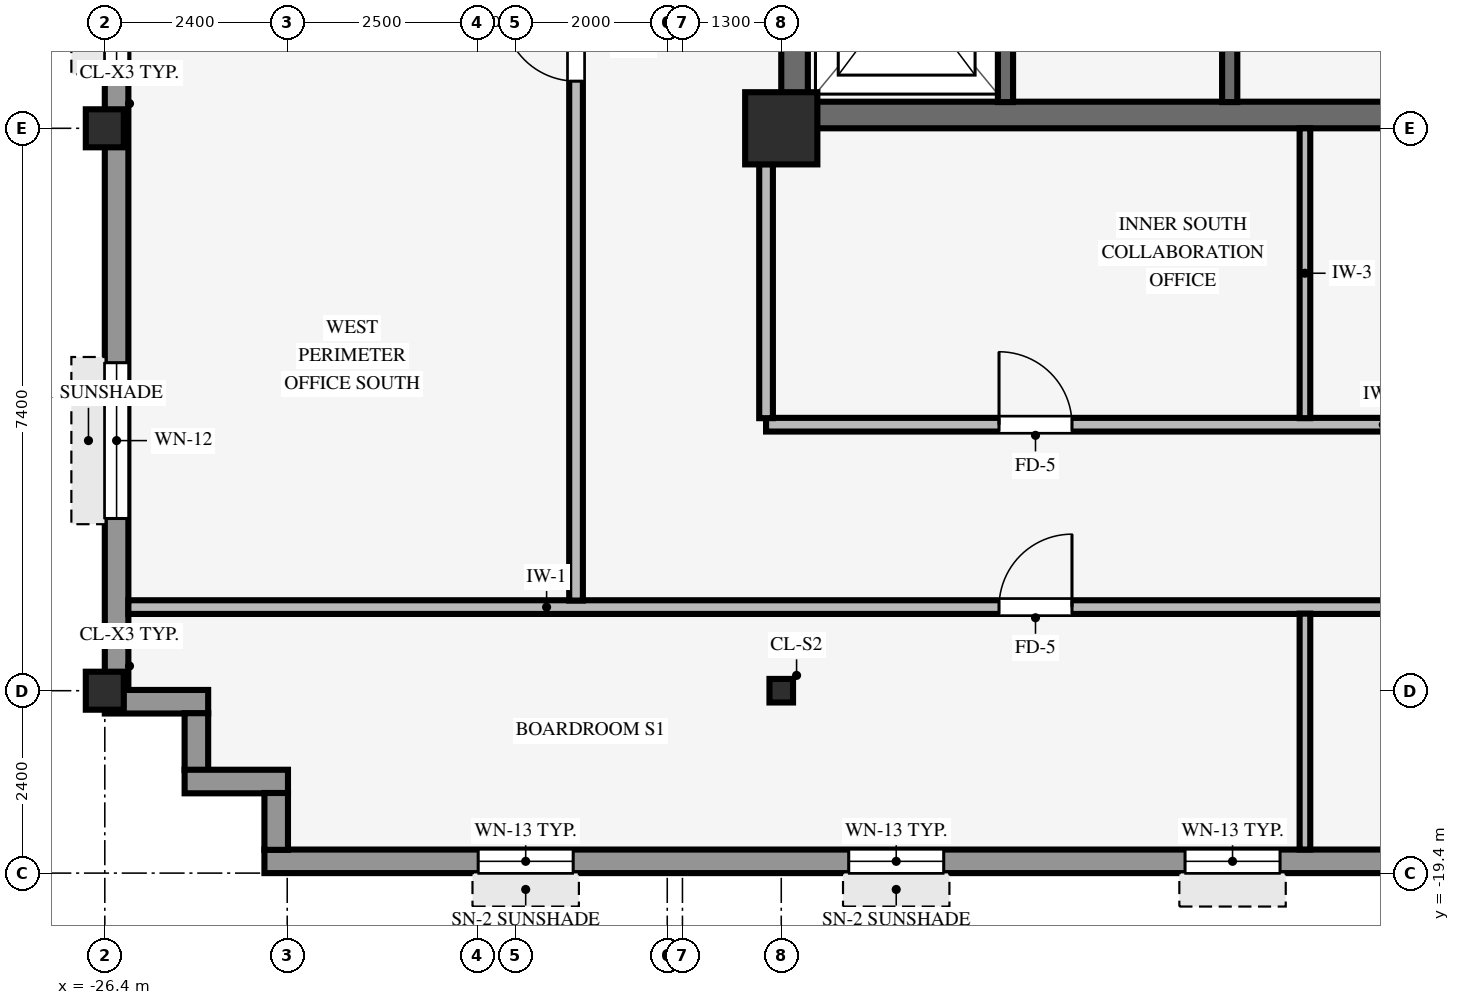
"""IFC4 building model, lengths in metres.
Left out: names, types, materials, properties, quantities, classifications, styles, units other than length and angle.
Written with IfcOpenShell. Run it as: python <this file> out.ifc"""

import sys

from ifc_helpers import new_model, si_unit, direction, frame, frame_2d, origin, origin_2d, place, context, subcontext, project, spatial, rectangle, hollow_rectangle, i_section, extrude, source, transform, mapped, element, fill, save


model = new_model("IFC4")
c1 = context("Model", 3, precision=1e-05, world=origin(), true_north=direction((0.0, 1.0)))
c2 = subcontext(c1, "Body", "Model", "MODEL_VIEW")
j1 = project(units=[si_unit("LENGTHUNIT", "METRE"), si_unit("PLANEANGLEUNIT", "RADIAN")], contexts=[c1])
p1 = place(None, origin())
s1 = spatial("IfcSite", under=j1, at=p1, CompositionType="ELEMENT")
p2 = place(p1, origin())
s2 = spatial("IfcBuilding", under=s1, at=p2, CompositionType="ELEMENT")
p3 = place(p2, frame((0.0, 0.0, 212.8)))
s3 = spatial("IfcBuildingStorey", under=s2, at=p3, CompositionType="ELEMENT", Elevation=212.8)
p4 = place(p3, frame((-17.5, -9.425, 0.0), z_axis=(0.0, 0.0, 1.0), x_axis=(1.0, 0.0, 0.0)))
e1 = element("IfcWall", 1, at=p4, inside=s3, PredefinedType="SHEAR", context=c2, shape_type="SweptSolid", body=[
    extrude(rectangle(XDim=8.5, YDim=0.35, at=frame_2d((4.25, 0.0))), origin(), (0.0, 0.0, 1.0), 3.37),
])
p5 = place(p3, frame((-17.325, -9.255, 0.0), z_axis=(0.0, 0.0, 1.0), x_axis=(0.0, 1.0, 0.0)))
e2 = element("IfcWall", 2, at=p5, inside=s3, PredefinedType="SHEAR", context=c2, shape_type="SweptSolid", body=[
    extrude(rectangle(XDim=18.51, YDim=0.35, at=frame_2d((9.255, 0.0))), origin(), (0.0, 0.0, 1.0), 3.37),
])
p6 = place(p3, frame((-17.5, -9.6, 0.0), z_axis=(0.0, 0.0, 1.0), x_axis=(1.0, 0.0, 0.0)))
e3 = element("IfcColumn", 3, at=p6, inside=s3, PredefinedType="COLUMN", context=c2, shape_type="SweptSolid", body=[
    extrude(rectangle(XDim=0.95, YDim=0.95, at=origin_2d()), origin(), (0.0, 0.0, 1.0), 3.37),
])
for number, where, z_axis, x_axis in (
    (4, (-26.4, -17.0, 0.0), (0.0, 0.0, 1.0), (1.0, 0.0, 0.0)),
    (5, (-26.4, -9.6, 0.0), (0.0, 0.0, 1.0), (1.0, 0.0, 0.0)),
):
    element("IfcColumn", number, at=place(p3, frame(where, z_axis=z_axis, x_axis=x_axis)), inside=s3, PredefinedType="COLUMN", context=c2, shape_type="SweptSolid", body=[
        extrude(hollow_rectangle(XDim=0.5, YDim=0.5, WallThickness=0.032, InnerFilletRadius=0.032, OuterFilletRadius=0.064, at=origin_2d()), origin(), (0.0, 0.0, 1.0), 3.37),
    ])
p7 = place(p3, frame((-17.5, -17.0, 0.0), z_axis=(0.0, 0.0, 1.0), x_axis=(1.0, 0.0, 0.0)))
e6 = element("IfcColumn", 6, at=p7, inside=s3, PredefinedType="COLUMN", context=c2, shape_type="SweptSolid", body=[
    extrude(i_section(OverallWidth=0.31, OverallDepth=0.31, WebThickness=0.015, FlangeThickness=0.015, FilletRadius=0.015, at=origin_2d()), origin(), (0.0, 0.0, 1.0), 3.37),
])
p8 = place(p3, frame((-24.3, -19.245, 0.0), z_axis=(0.0, 0.0, 1.0), x_axis=(1.0, 0.0, 0.0)))
e7 = element("IfcWall", 7, at=p8, inside=s3, PredefinedType="STANDARD", context=c2, shape_type="SweptSolid", body=[
    extrude(rectangle(XDim=41.0, YDim=0.31, at=frame_2d((20.5, 0.0))), origin(), (0.0, 0.0, 1.0), 2.705),
])
p9 = place(p8, frame((2.812, 0.0, 0.8)))
e8 = element("IfcOpeningElement", 8, at=p9, cuts=e7, PredefinedType="OPENING", context=c2, shape_type="SweptSolid", body=[
    extrude(rectangle(XDim=1.25, YDim=1.52, at=frame_2d((0.625, 0.76))), frame((0.0, 0.165, 0.0), z_axis=(0.0, -1.0, 0.0), x_axis=(1.0, 0.0, 0.0)), (0.0, 0.0, 1.0), 0.33),
])
p10 = place(p8, frame((7.688, 0.0, 0.8)))
e9 = element("IfcOpeningElement", 9, at=p10, cuts=e7, PredefinedType="OPENING", context=c2, shape_type="SweptSolid", body=[
    extrude(rectangle(XDim=1.25, YDim=1.52, at=frame_2d((0.625, 0.76))), frame((0.0, 0.165, 0.0), z_axis=(0.0, -1.0, 0.0), x_axis=(1.0, 0.0, 0.0)), (0.0, 0.0, 1.0), 0.33),
])
p11 = place(p8, frame((12.113, 0.0, 0.8)))
e10 = element("IfcOpeningElement", 10, at=p11, cuts=e7, PredefinedType="OPENING", context=c2, shape_type="SweptSolid", body=[
    extrude(rectangle(XDim=1.25, YDim=1.52, at=frame_2d((0.625, 0.76))), frame((0.0, 0.165, 0.0), z_axis=(0.0, -1.0, 0.0), x_axis=(1.0, 0.0, 0.0)), (0.0, 0.0, 1.0), 0.33),
])
p12 = place(p8, frame((17.438, 0.0, 0.8)))
e11 = element("IfcOpeningElement", 11, at=p12, cuts=e7, PredefinedType="OPENING", context=c2, shape_type="SweptSolid", body=[
    extrude(rectangle(XDim=1.25, YDim=1.52, at=frame_2d((0.625, 0.76))), frame((0.0, 0.165, 0.0), z_axis=(0.0, -1.0, 0.0), x_axis=(1.0, 0.0, 0.0)), (0.0, 0.0, 1.0), 0.33),
])
p13 = place(p8, frame((22.312, 0.0, 0.8)))
e12 = element("IfcOpeningElement", 12, at=p13, cuts=e7, PredefinedType="OPENING", context=c2, shape_type="SweptSolid", body=[
    extrude(rectangle(XDim=1.25, YDim=1.52, at=frame_2d((0.625, 0.76))), frame((0.0, 0.165, 0.0), z_axis=(0.0, -1.0, 0.0), x_axis=(1.0, 0.0, 0.0)), (0.0, 0.0, 1.0), 0.33),
])
p14 = place(p8, frame((27.188, 0.0, 0.8)))
e13 = element("IfcOpeningElement", 13, at=p14, cuts=e7, PredefinedType="OPENING", context=c2, shape_type="SweptSolid", body=[
    extrude(rectangle(XDim=1.25, YDim=1.52, at=frame_2d((0.625, 0.76))), frame((0.0, 0.165, 0.0), z_axis=(0.0, -1.0, 0.0), x_axis=(1.0, 0.0, 0.0)), (0.0, 0.0, 1.0), 0.33),
])
p15 = place(p8, frame((31.163, 0.0, 0.8)))
e14 = element("IfcOpeningElement", 14, at=p15, cuts=e7, PredefinedType="OPENING", context=c2, shape_type="SweptSolid", body=[
    extrude(rectangle(XDim=1.25, YDim=1.52, at=frame_2d((0.625, 0.76))), frame((0.0, 0.165, 0.0), z_axis=(0.0, -1.0, 0.0), x_axis=(1.0, 0.0, 0.0)), (0.0, 0.0, 1.0), 0.33),
])
p16 = place(p8, frame((36.938, 0.0, 0.8)))
e15 = element("IfcOpeningElement", 15, at=p16, cuts=e7, PredefinedType="OPENING", context=c2, shape_type="SweptSolid", body=[
    extrude(rectangle(XDim=1.25, YDim=1.52, at=frame_2d((0.625, 0.76))), frame((0.0, 0.165, 0.0), z_axis=(0.0, -1.0, 0.0), x_axis=(1.0, 0.0, 0.0)), (0.0, 0.0, 1.0), 0.33),
])
p17 = place(p3, frame((-26.245, -16.994, 0.0), z_axis=(0.0, 0.0, 1.0), x_axis=(0.0, 1.0, 0.0)))
e16 = element("IfcWall", 16, at=p17, inside=s3, PredefinedType="STANDARD", context=c2, shape_type="SweptSolid", body=[
    extrude(rectangle(XDim=33.988, YDim=0.31, at=frame_2d((16.994, 0.0))), origin(), (0.0, 0.0, 1.0), 2.705),
])
p18 = place(p17, frame((2.26, 0.0, 0.8)))
e17 = element("IfcOpeningElement", 17, at=p18, cuts=e16, PredefinedType="OPENING", context=c2, shape_type="SweptSolid", body=[
    extrude(rectangle(XDim=2.05, YDim=1.52, at=frame_2d((1.025, 0.76))), frame((0.0, 0.165, 0.0), z_axis=(0.0, -1.0, 0.0), x_axis=(1.0, 0.0, 0.0)), (0.0, 0.0, 1.0), 0.33),
])
p19 = place(p17, frame((8.18, 0.0, 0.8)))
e18 = element("IfcOpeningElement", 18, at=p19, cuts=e16, PredefinedType="OPENING", context=c2, shape_type="SweptSolid", body=[
    extrude(rectangle(XDim=2.05, YDim=1.52, at=frame_2d((1.025, 0.76))), frame((0.0, 0.165, 0.0), z_axis=(0.0, -1.0, 0.0), x_axis=(1.0, 0.0, 0.0)), (0.0, 0.0, 1.0), 0.33),
])
p20 = place(p17, frame((10.949, 0.0, 0.8)))
e19 = element("IfcOpeningElement", 19, at=p20, cuts=e16, PredefinedType="OPENING", context=c2, shape_type="SweptSolid", body=[
    extrude(rectangle(XDim=2.05, YDim=1.52, at=frame_2d((1.025, 0.76))), frame((0.0, 0.165, 0.0), z_axis=(0.0, -1.0, 0.0), x_axis=(1.0, 0.0, 0.0)), (0.0, 0.0, 1.0), 0.33),
])
p21 = place(p17, frame((20.539, 0.0, 0.8)))
e20 = element("IfcOpeningElement", 20, at=p21, cuts=e16, PredefinedType="OPENING", context=c2, shape_type="SweptSolid", body=[
    extrude(rectangle(XDim=2.05, YDim=1.52, at=frame_2d((1.025, 0.76))), frame((0.0, 0.165, 0.0), z_axis=(0.0, -1.0, 0.0), x_axis=(1.0, 0.0, 0.0)), (0.0, 0.0, 1.0), 0.33),
])
p22 = place(p17, frame((23.758, 0.0, 0.8)))
e21 = element("IfcOpeningElement", 21, at=p22, cuts=e16, PredefinedType="OPENING", context=c2, shape_type="SweptSolid", body=[
    extrude(rectangle(XDim=2.05, YDim=1.52, at=frame_2d((1.025, 0.76))), frame((0.0, 0.165, 0.0), z_axis=(0.0, -1.0, 0.0), x_axis=(1.0, 0.0, 0.0)), (0.0, 0.0, 1.0), 0.33),
])
p23 = place(p17, frame((29.678, 0.0, 0.8)))
e22 = element("IfcOpeningElement", 22, at=p23, cuts=e16, PredefinedType="OPENING", context=c2, shape_type="SweptSolid", body=[
    extrude(rectangle(XDim=2.05, YDim=1.52, at=frame_2d((1.025, 0.76))), frame((0.0, 0.165, 0.0), z_axis=(0.0, -1.0, 0.0), x_axis=(1.0, 0.0, 0.0)), (0.0, 0.0, 1.0), 0.33),
])
p24 = place(p3, frame((-26.4, -17.145, 0.0), z_axis=(0.0, 0.0, 1.0), x_axis=(1.0, 0.0, 0.0)))
e23 = element("IfcWall", 23, at=p24, inside=s3, PredefinedType="STANDARD", context=c2, shape_type="SweptSolid", body=[
    extrude(rectangle(XDim=1.36, YDim=0.31, at=frame_2d((0.68, 0.0))), origin(), (0.0, 0.0, 1.0), 2.816),
])
p25 = place(p3, frame((-25.195, -18.044, 0.0), z_axis=(0.0, 0.0, 1.0), x_axis=(0.0, 1.0, 0.0)))
e24 = element("IfcWall", 24, at=p25, inside=s3, PredefinedType="STANDARD", context=c2, shape_type="SweptSolid", body=[
    extrude(rectangle(XDim=0.748, YDim=0.31, at=frame_2d((0.374, 0.0))), origin(), (0.0, 0.0, 1.0), 2.816),
])
p26 = place(p3, frame((-25.35, -18.195, 0.0), z_axis=(0.0, 0.0, 1.0), x_axis=(1.0, 0.0, 0.0)))
e25 = element("IfcWall", 25, at=p26, inside=s3, PredefinedType="STANDARD", context=c2, shape_type="SweptSolid", body=[
    extrude(rectangle(XDim=1.36, YDim=0.31, at=frame_2d((0.68, 0.0))), origin(), (0.0, 0.0, 1.0), 2.816),
])
p27 = place(p3, frame((-24.145, -19.094, 0.0), z_axis=(0.0, 0.0, 1.0), x_axis=(0.0, 1.0, 0.0)))
e26 = element("IfcWall", 26, at=p27, inside=s3, PredefinedType="STANDARD", context=c2, shape_type="SweptSolid", body=[
    extrude(rectangle(XDim=0.748, YDim=0.31, at=frame_2d((0.374, 0.0))), origin(), (0.0, 0.0, 1.0), 2.816),
])
p28 = place(p3, frame((-14.55, -9.255, 0.0), z_axis=(0.0, 0.0, 1.0), x_axis=(0.0, 1.0, 0.0)))
e27 = element("IfcWall", 27, at=p28, inside=s3, PredefinedType="SHEAR", context=c2, shape_type="SweptSolid", body=[
    extrude(rectangle(XDim=3.06, YDim=0.2, at=frame_2d((1.53, 0.0))), origin(), (0.0, 0.0, 1.0), 3.37),
])
p29 = place(p28, frame((0.98, 0.0, 0.0)))
e28 = element("IfcOpeningElement", 28, at=p29, cuts=e27, PredefinedType="OPENING", context=c2, shape_type="SweptSolid", body=[
    extrude(rectangle(XDim=1.15, YDim=2.15, at=frame_2d((0.575, 1.075))), frame((0.0, 0.11, 0.0), z_axis=(0.0, -1.0, 0.0), x_axis=(1.0, 0.0, 0.0)), (0.0, 0.0, 1.0), 0.22),
])
p30 = place(p3, frame((-11.6, -9.255, 0.0), z_axis=(0.0, 0.0, 1.0), x_axis=(0.0, 1.0, 0.0)))
e29 = element("IfcWall", 29, at=p30, inside=s3, PredefinedType="SHEAR", context=c2, shape_type="SweptSolid", body=[
    extrude(rectangle(XDim=8.025, YDim=0.2, at=frame_2d((4.012, 0.0))), origin(), (0.0, 0.0, 1.0), 3.37),
])
p31 = place(p30, frame((5.615, 0.0, 0.0)))
e30 = element("IfcOpeningElement", 30, at=p31, cuts=e29, PredefinedType="OPENING", context=c2, shape_type="SweptSolid", body=[
    extrude(rectangle(XDim=0.88, YDim=2.1, at=frame_2d((0.44, 1.05))), frame((0.0, 0.11, 0.0), z_axis=(0.0, -1.0, 0.0), x_axis=(1.0, 0.0, 0.0)), (0.0, 0.0, 1.0), 0.22),
])
p32 = place(p3, frame((-26.09, -15.9, 0.0), z_axis=(0.0, 0.0, 1.0), x_axis=(1.0, 0.0, 0.0)))
e31 = element("IfcWall", 31, at=p32, inside=s3, PredefinedType="PARTITIONING", context=c2, shape_type="SweptSolid", body=[
    extrude(rectangle(XDim=35.09, YDim=0.18, at=frame_2d((17.545, 0.0))), origin(), (0.0, 0.0, 1.0), 3.36),
])
p33 = place(p32, frame((23.605, 0.0, 0.0)))
e32 = element("IfcOpeningElement", 32, at=p33, cuts=e31, PredefinedType="OPENING", context=c2, shape_type="SweptSolid", body=[
    extrude(rectangle(XDim=0.96, YDim=2.1, at=frame_2d((0.48, 1.05))), frame((0.0, 0.1, 0.0), z_axis=(0.0, -1.0, 0.0), x_axis=(1.0, 0.0, 0.0)), (0.0, 0.0, 1.0), 0.2),
])
p34 = place(p32, frame((11.455, 0.0, 0.0)))
e33 = element("IfcOpeningElement", 33, at=p34, cuts=e31, PredefinedType="OPENING", context=c2, shape_type="SweptSolid", body=[
    extrude(rectangle(XDim=0.96, YDim=2.1, at=frame_2d((0.48, 1.05))), frame((0.0, 0.1, 0.0), z_axis=(0.0, -1.0, 0.0), x_axis=(1.0, 0.0, 0.0)), (0.0, 0.0, 1.0), 0.2),
])
p35 = place(p3, frame((-17.7, -13.5, 0.0), z_axis=(0.0, 0.0, 1.0), x_axis=(1.0, 0.0, 0.0)))
e34 = element("IfcWall", 34, at=p35, inside=s3, PredefinedType="PARTITIONING", context=c2, shape_type="SweptSolid", body=[
    extrude(rectangle(XDim=24.3, YDim=0.18, at=frame_2d((12.15, 0.0))), origin(), (0.0, 0.0, 1.0), 3.008),
])
p36 = place(p35, frame((12.215, 0.0, 0.0)))
e35 = element("IfcOpeningElement", 35, at=p36, cuts=e34, PredefinedType="OPENING", context=c2, shape_type="SweptSolid", body=[
    extrude(rectangle(XDim=0.96, YDim=2.1, at=frame_2d((0.48, 1.05))), frame((0.0, 0.1, 0.0), z_axis=(0.0, -1.0, 0.0), x_axis=(1.0, 0.0, 0.0)), (0.0, 0.0, 1.0), 0.2),
])
p37 = place(p35, frame((3.065, 0.0, 0.0)))
e36 = element("IfcOpeningElement", 36, at=p37, cuts=e34, PredefinedType="OPENING", context=c2, shape_type="SweptSolid", body=[
    extrude(rectangle(XDim=0.96, YDim=2.1, at=frame_2d((0.48, 1.05))), frame((0.0, 0.1, 0.0), z_axis=(0.0, -1.0, 0.0), x_axis=(1.0, 0.0, 0.0)), (0.0, 0.0, 1.0), 0.2),
])
p38 = place(p35, frame((18.9, 0.0, 0.0)))
e37 = element("IfcOpeningElement", 37, at=p38, cuts=e34, PredefinedType="OPENING", context=c2, shape_type="SweptSolid", body=[
    extrude(rectangle(XDim=0.9, YDim=2.1, at=frame_2d((0.45, 1.05))), frame((0.0, 0.1, 0.0), z_axis=(0.0, -1.0, 0.0), x_axis=(1.0, 0.0, 0.0)), (0.0, 0.0, 1.0), 0.2),
])
p39 = place(p35, frame((21.0, 0.0, 0.0)))
e38 = element("IfcOpeningElement", 38, at=p39, cuts=e34, PredefinedType="OPENING", context=c2, shape_type="SweptSolid", body=[
    extrude(rectangle(XDim=0.9, YDim=2.1, at=frame_2d((0.45, 1.05))), frame((0.0, 0.1, 0.0), z_axis=(0.0, -1.0, 0.0), x_axis=(1.0, 0.0, 0.0)), (0.0, 0.0, 1.0), 0.2),
])
p40 = place(p3, frame((-20.2, -15.814, 0.0), z_axis=(0.0, 0.0, 1.0), x_axis=(0.0, 1.0, 0.0)))
e39 = element("IfcWall", 39, at=p40, inside=s3, PredefinedType="PARTITIONING", context=c2, shape_type="SweptSolid", body=[
    extrude(rectangle(XDim=31.628, YDim=0.18, at=frame_2d((15.814, 0.0))), origin(), (0.0, 0.0, 1.0), 3.36),
])
p41 = place(p40, frame((20.334, 0.0, 0.0)))
e40 = element("IfcOpeningElement", 40, at=p41, cuts=e39, PredefinedType="OPENING", context=c2, shape_type="SweptSolid", body=[
    extrude(rectangle(XDim=0.96, YDim=2.1, at=frame_2d((0.48, 1.05))), frame((0.0, 0.1, 0.0), z_axis=(0.0, -1.0, 0.0), x_axis=(1.0, 0.0, 0.0)), (0.0, 0.0, 1.0), 0.2),
])
p42 = place(p40, frame((6.834, 0.0, 0.0)))
e41 = element("IfcOpeningElement", 41, at=p42, cuts=e39, PredefinedType="OPENING", context=c2, shape_type="SweptSolid", body=[
    extrude(rectangle(XDim=0.96, YDim=2.1, at=frame_2d((0.48, 1.05))), frame((0.0, 0.1, 0.0), z_axis=(0.0, -1.0, 0.0), x_axis=(1.0, 0.0, 0.0)), (0.0, 0.0, 1.0), 0.2),
])
p43 = place(p3, frame((-17.7, -13.414, 0.0), z_axis=(0.0, 0.0, 1.0), x_axis=(0.0, 1.0, 0.0)))
e42 = element("IfcWall", 42, at=p43, inside=s3, PredefinedType="PARTITIONING", context=c2, shape_type="SweptSolid", body=[
    extrude(rectangle(XDim=3.343, YDim=0.18, at=frame_2d((1.671, 0.0))), origin(), (0.0, 0.0, 1.0), 2.816),
])
p44 = place(p3, frame((-10.61, -19.09, 0.0), z_axis=(0.0, 0.0, 1.0), x_axis=(0.0, 1.0, 0.0)))
e43 = element("IfcWall", 43, at=p44, inside=s3, PredefinedType="PARTITIONING", context=c2, shape_type="SweptSolid", body=[
    extrude(rectangle(XDim=3.104, YDim=0.14, at=frame_2d((1.552, 0.0))), origin(), (0.0, 0.0, 1.0), 3.36),
])
p45 = place(p3, frame((-10.61, -13.414, 0.0), z_axis=(0.0, 0.0, 1.0), x_axis=(0.0, 1.0, 0.0)))
e44 = element("IfcWall", 44, at=p45, inside=s3, PredefinedType="PARTITIONING", context=c2, shape_type="SweptSolid", body=[
    extrude(rectangle(XDim=3.814, YDim=0.14, at=frame_2d((1.907, 0.0))), origin(), (0.0, 0.0, 1.0), 3.36),
])
m1 = source(origin(), c2, "Body", "SweptSolid", [
    extrude(rectangle(XDim=1.25, YDim=1.52, at=frame_2d((0.625, 0.76))), frame((0.0, 0.03, 0.0), z_axis=(0.0, -1.0, 0.0), x_axis=(1.0, 0.0, 0.0)), (0.0, 0.0, 1.0), 0.06),
])
p46 = place(p9, origin())
e45 = element("IfcWindow", 45, at=p46, inside=s3, PartitioningType="SINGLE_PANEL", PredefinedType="WINDOW", context=c2, shape_type="MappedRepresentation", body=[
    mapped(m1, transform((0.0, 0.0, 0.0), scale=1.0)),
])
fill(e8, e45)
p47 = place(p10, origin())
e46 = element("IfcWindow", 46, at=p47, inside=s3, PartitioningType="SINGLE_PANEL", PredefinedType="WINDOW", context=c2, shape_type="MappedRepresentation", body=[
    mapped(m1, transform((0.0, 0.0, 0.0), scale=1.0)),
])
fill(e9, e46)
p48 = place(p11, origin())
e47 = element("IfcWindow", 47, at=p48, inside=s3, PartitioningType="SINGLE_PANEL", PredefinedType="WINDOW", context=c2, shape_type="MappedRepresentation", body=[
    mapped(m1, transform((0.0, 0.0, 0.0), scale=1.0)),
])
fill(e10, e47)
m2 = source(origin(), c2, "Body", "SweptSolid", [
    extrude(rectangle(XDim=2.05, YDim=1.52, at=frame_2d((1.025, 0.76))), frame((0.0, 0.03, 0.0), z_axis=(0.0, -1.0, 0.0), x_axis=(1.0, 0.0, 0.0)), (0.0, 0.0, 1.0), 0.06),
])
p49 = place(p18, origin())
e48 = element("IfcWindow", 48, at=p49, inside=s3, PartitioningType="SINGLE_PANEL", PredefinedType="WINDOW", context=c2, shape_type="MappedRepresentation", body=[
    mapped(m2, transform((0.0, 0.0, 0.0), scale=1.0)),
])
fill(e17, e48)
p50 = place(p19, origin())
e49 = element("IfcWindow", 49, at=p50, inside=s3, PartitioningType="SINGLE_PANEL", PredefinedType="WINDOW", context=c2, shape_type="MappedRepresentation", body=[
    mapped(m2, transform((0.0, 0.0, 0.0), scale=1.0)),
])
fill(e18, e49)
m3 = source(origin(), c2, "Body", "SweptSolid", [
    extrude(rectangle(XDim=0.96, YDim=2.1, at=frame_2d((0.48, 1.05))), frame((0.0, 0.025, 0.0), z_axis=(0.0, -1.0, 0.0), x_axis=(1.0, 0.0, 0.0)), (0.0, 0.0, 1.0), 0.05),
])
p51 = place(p42, origin())
e50 = element("IfcDoor", 50, at=p51, inside=s3, OperationType="SINGLE_SWING_RIGHT", PredefinedType="DOOR", context=c2, shape_type="MappedRepresentation", body=[
    mapped(m3, transform((0.0, 0.0, 0.0), scale=1.0)),
])
fill(e41, e50)
p52 = place(p34, origin())
e51 = element("IfcDoor", 51, at=p52, inside=s3, OperationType="SINGLE_SWING_RIGHT", PredefinedType="DOOR", context=c2, shape_type="MappedRepresentation", body=[
    mapped(m3, transform((0.0, 0.0, 0.0), scale=1.0)),
])
fill(e33, e51)
p53 = place(p37, origin())
e52 = element("IfcDoor", 52, at=p53, inside=s3, OperationType="SINGLE_SWING_LEFT", PredefinedType="DOOR", context=c2, shape_type="MappedRepresentation", body=[
    mapped(m3, transform((0.0, 0.0, 0.0), scale=1.0)),
])
fill(e36, e52)
save(model, sys.argv[1])
